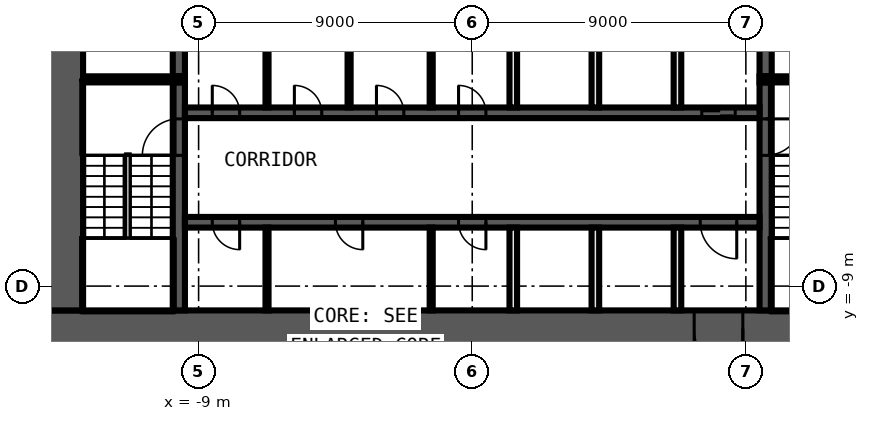
"""IFC4 building model, lengths in metres.
Left out: names, types, materials, properties, quantities, classifications, styles, units other than length and angle.
Written with IfcOpenShell. Run it as: python <this file> out.ifc"""

import sys

from ifc_helpers import new_model, si_unit, direction, frame, frame_2d, origin, place, context, subcontext, project, spatial, rectangle, extrude, element, fill, save


model = new_model("IFC4")
c1 = context("Model", 3, precision=1e-05, world=origin(), true_north=direction((0.0, 1.0)))
c2 = subcontext(c1, "Body", "Model", "MODEL_VIEW")
j1 = project(units=[si_unit("LENGTHUNIT", "METRE"), si_unit("PLANEANGLEUNIT", "RADIAN")], contexts=[c1])
p1 = place(None, origin())
s1 = spatial("IfcSite", under=j1, at=p1, CompositionType="ELEMENT")
p2 = place(p1, origin())
s2 = spatial("IfcBuilding", under=s1, at=p2, CompositionType="ELEMENT")
p3 = place(p2, frame((0.0, 0.0, 27.0)))
s3 = spatial("IfcBuildingStorey", under=s2, at=p3, CompositionType="ELEMENT", Elevation=27.0)
p4 = place(p3, frame((14.0, -10.4, 0.0), z_axis=(0.0, 0.0, 1.0), x_axis=(-1.0, 0.0, 0.0)))
e1 = element("IfcWall", 1, at=p4, inside=s3, PredefinedType="SHEAR", context=c2, shape_type="SweptSolid", body=[
    extrude(rectangle(XDim=28.0, YDim=1.2, at=frame_2d((14.0, 0.0))), origin(), (0.0, 0.0, 1.0), 5.55),
])
p5 = place(p4, frame((5.1, 0.0, 0.0)))
e2 = element("IfcOpeningElement", 2, at=p5, cuts=e1, PredefinedType="OPENING", context=c2, shape_type="SweptSolid", body=[
    extrude(rectangle(XDim=1.6, YDim=2.1, at=frame_2d((0.8, 1.05))), frame((0.0, 0.61, 0.0), z_axis=(0.0, -1.0, 0.0), x_axis=(1.0, 0.0, 0.0)), (0.0, 0.0, 1.0), 1.22),
])
p6 = place(p3, frame((-13.4, -9.8, 0.0), z_axis=(0.0, 0.0, 1.0), x_axis=(0.0, 1.0, 0.0)))
e3 = element("IfcWall", 3, at=p6, inside=s3, PredefinedType="SHEAR", context=c2, shape_type="SweptSolid", body=[
    extrude(rectangle(XDim=19.6, YDim=1.2, at=frame_2d((9.8, 0.0))), origin(), (0.0, 0.0, 1.0), 5.55),
])
p7 = place(p3, frame((9.65, -2.3, 0.0), z_axis=(0.0, 0.0, 1.0), x_axis=(0.0, -1.0, 0.0)))
e4 = element("IfcWall", 4, at=p7, inside=s3, PredefinedType="SHEAR", context=c2, shape_type="SweptSolid", body=[
    extrude(rectangle(XDim=7.5, YDim=0.4, at=frame_2d((3.75, 0.0))), origin(), (0.0, 0.0, 1.0), 5.55),
])
p8 = place(p7, frame((1.2, 0.0, 0.0)))
e5 = element("IfcOpeningElement", 5, at=p8, cuts=e4, PredefinedType="OPENING", context=c2, shape_type="SweptSolid", body=[
    extrude(rectangle(XDim=1.2, YDim=2.1, at=frame_2d((0.6, 1.05))), frame((0.0, 0.21, 0.0), z_axis=(0.0, -1.0, 0.0), x_axis=(1.0, 0.0, 0.0)), (0.0, 0.0, 1.0), 0.42),
])
p9 = place(p3, frame((9.65, 2.1, 0.0), z_axis=(0.0, 0.0, 1.0), x_axis=(0.0, -1.0, 0.0)))
e6 = element("IfcWall", 6, at=p9, inside=s3, PredefinedType="SHEAR", context=c2, shape_type="SweptSolid", body=[
    extrude(rectangle(XDim=4.2, YDim=0.4, at=frame_2d((2.1, 0.0))), origin(), (0.0, 0.0, 1.0), 5.55),
])
p10 = place(p9, frame((0.15, 0.0, 0.0)))
e7 = element("IfcOpeningElement", 7, at=p10, cuts=e6, PredefinedType="OPENING", context=c2, shape_type="SweptSolid", body=[
    extrude(rectangle(XDim=0.9, YDim=2.1, at=frame_2d((0.45, 1.05))), frame((0.0, 0.21, 0.0), z_axis=(0.0, -1.0, 0.0), x_axis=(1.0, 0.0, 0.0)), (0.0, 0.0, 1.0), 0.42),
])
p11 = place(p3, frame((-9.65, -9.8, 0.0), z_axis=(0.0, 0.0, 1.0), x_axis=(0.0, 1.0, 0.0)))
e8 = element("IfcWall", 8, at=p11, inside=s3, PredefinedType="SHEAR", context=c2, shape_type="SweptSolid", body=[
    extrude(rectangle(XDim=7.5, YDim=0.4, at=frame_2d((3.75, 0.0))), origin(), (0.0, 0.0, 1.0), 5.55),
])
p12 = place(p11, frame((5.1, 0.0, 0.0)))
e9 = element("IfcOpeningElement", 9, at=p12, cuts=e8, PredefinedType="OPENING", context=c2, shape_type="SweptSolid", body=[
    extrude(rectangle(XDim=1.2, YDim=2.1, at=frame_2d((0.6, 1.05))), frame((0.0, 0.21, 0.0), z_axis=(0.0, -1.0, 0.0), x_axis=(1.0, 0.0, 0.0)), (0.0, 0.0, 1.0), 0.42),
])
p13 = place(p3, frame((-9.65, -2.1, 0.0), z_axis=(0.0, 0.0, 1.0), x_axis=(0.0, 1.0, 0.0)))
e10 = element("IfcWall", 10, at=p13, inside=s3, PredefinedType="SHEAR", context=c2, shape_type="SweptSolid", body=[
    extrude(rectangle(XDim=4.2, YDim=0.4, at=frame_2d((2.1, 0.0))), origin(), (0.0, 0.0, 1.0), 5.55),
])
for number, where, z_axis, x_axis in (
    (11, (9.45, -2.2, 0.0), (0.0, 0.0, 1.0), (1.0, 0.0, 0.0)),
    (12, (-9.45, -2.2, 0.0), (0.0, 0.0, 1.0), (-1.0, 0.0, 0.0)),
):
    element("IfcWall", number, at=place(p3, frame(where, z_axis=z_axis, x_axis=x_axis)), inside=s3, PredefinedType="SHEAR", context=c2, shape_type="SweptSolid", body=[
        extrude(rectangle(XDim=3.35, YDim=0.2, at=frame_2d((1.675, 0.0))), origin(), (0.0, 0.0, 1.0), 5.55),
    ])
p14 = place(p3, frame((-9.45, -3.3, 0.0), z_axis=(0.0, 0.0, 1.0), x_axis=(1.0, 0.0, 0.0)))
e13 = element("IfcWall", 13, at=p14, inside=s3, PredefinedType="SHEAR", context=c2, shape_type="SweptSolid", body=[
    extrude(rectangle(XDim=18.9, YDim=0.35, at=frame_2d((9.45, 0.0))), origin(), (0.0, 0.0, 1.0), 5.55),
])
p15 = place(p14, frame((17.0, 0.0, 0.0)))
e14 = element("IfcOpeningElement", 14, at=p15, cuts=e13, PredefinedType="OPENING", context=c2, shape_type="SweptSolid", body=[
    extrude(rectangle(XDim=1.1, YDim=2.1, at=frame_2d((0.55, 1.05))), frame((0.0, 0.185, 0.0), z_axis=(0.0, -1.0, 0.0), x_axis=(1.0, 0.0, 0.0)), (0.0, 0.0, 1.0), 0.37),
])
p16 = place(p14, frame((0.9, 0.0, 0.0)))
e15 = element("IfcOpeningElement", 15, at=p16, cuts=e13, PredefinedType="OPENING", context=c2, shape_type="SweptSolid", body=[
    extrude(rectangle(XDim=0.9, YDim=2.1, at=frame_2d((0.45, 1.05))), frame((0.0, 0.185, 0.0), z_axis=(0.0, -1.0, 0.0), x_axis=(1.0, 0.0, 0.0)), (0.0, 0.0, 1.0), 0.37),
])
p17 = place(p14, frame((3.6, 0.0, 0.0)))
e16 = element("IfcOpeningElement", 16, at=p17, cuts=e13, PredefinedType="OPENING", context=c2, shape_type="SweptSolid", body=[
    extrude(rectangle(XDim=0.9, YDim=2.1, at=frame_2d((0.45, 1.05))), frame((0.0, 0.185, 0.0), z_axis=(0.0, -1.0, 0.0), x_axis=(1.0, 0.0, 0.0)), (0.0, 0.0, 1.0), 0.37),
])
p18 = place(p14, frame((6.3, 0.0, 0.0)))
e17 = element("IfcOpeningElement", 17, at=p18, cuts=e13, PredefinedType="OPENING", context=c2, shape_type="SweptSolid", body=[
    extrude(rectangle(XDim=0.9, YDim=2.1, at=frame_2d((0.45, 1.05))), frame((0.0, 0.185, 0.0), z_axis=(0.0, -1.0, 0.0), x_axis=(1.0, 0.0, 0.0)), (0.0, 0.0, 1.0), 0.37),
])
p19 = place(p14, frame((9.0, 0.0, 0.0)))
e18 = element("IfcOpeningElement", 18, at=p19, cuts=e13, PredefinedType="OPENING", context=c2, shape_type="SweptSolid", body=[
    extrude(rectangle(XDim=0.9, YDim=2.1, at=frame_2d((0.45, 1.05))), frame((0.0, 0.185, 0.0), z_axis=(0.0, -1.0, 0.0), x_axis=(1.0, 0.0, 0.0)), (0.0, 0.0, 1.0), 0.37),
])
p20 = place(p3, frame((9.45, -6.9, 0.0), z_axis=(0.0, 0.0, 1.0), x_axis=(-1.0, 0.0, 0.0)))
e19 = element("IfcWall", 19, at=p20, inside=s3, PredefinedType="SHEAR", context=c2, shape_type="SweptSolid", body=[
    extrude(rectangle(XDim=18.9, YDim=0.35, at=frame_2d((9.45, 0.0))), origin(), (0.0, 0.0, 1.0), 5.55),
])
p21 = place(p20, frame((0.75, 0.0, 0.0)))
e20 = element("IfcOpeningElement", 20, at=p21, cuts=e19, PredefinedType="OPENING", context=c2, shape_type="SweptSolid", body=[
    extrude(rectangle(XDim=1.2, YDim=2.1, at=frame_2d((0.6, 1.05))), frame((0.0, 0.185, 0.0), z_axis=(0.0, -1.0, 0.0), x_axis=(1.0, 0.0, 0.0)), (0.0, 0.0, 1.0), 0.37),
])
p22 = place(p20, frame((17.1, 0.0, 0.0)))
e21 = element("IfcOpeningElement", 21, at=p22, cuts=e19, PredefinedType="OPENING", context=c2, shape_type="SweptSolid", body=[
    extrude(rectangle(XDim=0.9, YDim=2.1, at=frame_2d((0.45, 1.05))), frame((0.0, 0.185, 0.0), z_axis=(0.0, -1.0, 0.0), x_axis=(1.0, 0.0, 0.0)), (0.0, 0.0, 1.0), 0.37),
])
p23 = place(p20, frame((13.05, 0.0, 0.0)))
e22 = element("IfcOpeningElement", 22, at=p23, cuts=e19, PredefinedType="OPENING", context=c2, shape_type="SweptSolid", body=[
    extrude(rectangle(XDim=0.9, YDim=2.1, at=frame_2d((0.45, 1.05))), frame((0.0, 0.185, 0.0), z_axis=(0.0, -1.0, 0.0), x_axis=(1.0, 0.0, 0.0)), (0.0, 0.0, 1.0), 0.37),
])
p24 = place(p20, frame((9.0, 0.0, 0.0)))
e23 = element("IfcOpeningElement", 23, at=p24, cuts=e19, PredefinedType="OPENING", context=c2, shape_type="SweptSolid", body=[
    extrude(rectangle(XDim=0.9, YDim=2.1, at=frame_2d((0.45, 1.05))), frame((0.0, 0.185, 0.0), z_axis=(0.0, -1.0, 0.0), x_axis=(1.0, 0.0, 0.0)), (0.0, 0.0, 1.0), 0.37),
])
for number, where, z_axis, x_axis in (
    (24, (6.75, -9.8, 0.0), (0.0, 0.0, 1.0), (0.0, 1.0, 0.0)),
    (25, (6.75, -3.125, 0.0), (0.0, 0.0, 1.0), (0.0, 1.0, 0.0)),
    (26, (4.05, -9.8, 0.0), (0.0, 0.0, 1.0), (0.0, 1.0, 0.0)),
    (27, (4.05, -3.125, 0.0), (0.0, 0.0, 1.0), (0.0, 1.0, 0.0)),
    (28, (1.35, -9.8, 0.0), (0.0, 0.0, 1.0), (0.0, 1.0, 0.0)),
    (29, (1.35, -3.125, 0.0), (0.0, 0.0, 1.0), (0.0, 1.0, 0.0)),
):
    element("IfcWall", number, at=place(p3, frame(where, z_axis=z_axis, x_axis=x_axis)), inside=s3, PredefinedType="SOLIDWALL", context=c2, shape_type="SweptSolid", body=[
        extrude(rectangle(XDim=2.725, YDim=0.25, at=frame_2d((1.363, 0.0))), origin(), (0.0, 0.0, 1.0), 5.55),
    ])
for number, where, z_axis, x_axis in (
    (30, (-1.35, -9.8, 0.0), (0.0, 0.0, 1.0), (0.0, 1.0, 0.0)),
    (31, (-1.35, -3.125, 0.0), (0.0, 0.0, 1.0), (0.0, 1.0, 0.0)),
    (32, (-4.05, -3.125, 0.0), (0.0, 0.0, 1.0), (0.0, 1.0, 0.0)),
    (33, (-6.75, -9.8, 0.0), (0.0, 0.0, 1.0), (0.0, 1.0, 0.0)),
    (34, (-6.75, -3.125, 0.0), (0.0, 0.0, 1.0), (0.0, 1.0, 0.0)),
):
    element("IfcWall", number, at=place(p3, frame(where, z_axis=z_axis, x_axis=x_axis)), inside=s3, PredefinedType="PARTITIONING", context=c2, shape_type="SweptSolid", body=[
        extrude(rectangle(XDim=2.725, YDim=0.1, at=frame_2d((1.363, 0.0))), origin(), (0.0, 0.0, 1.0), 5.55),
    ])
p25 = place(p15, origin())
e35 = element("IfcDoor", 35, at=p25, inside=s3, OperationType="DOUBLE_DOOR_SLIDING", PredefinedType="DOOR", context=c2, shape_type="SweptSolid", body=[
    extrude(rectangle(XDim=1.1, YDim=2.1, at=frame_2d((0.55, 1.05))), frame((0.0, 0.025, 0.0), z_axis=(0.0, -1.0, 0.0), x_axis=(1.0, 0.0, 0.0)), (0.0, 0.0, 1.0), 0.05),
])
fill(e14, e35)
p26 = place(p5, origin())
e36 = element("IfcDoor", 36, at=p26, inside=s3, OperationType="DOUBLE_DOOR_SINGLE_SWING", PredefinedType="DOOR", context=c2, shape_type="SweptSolid", body=[
    extrude(rectangle(XDim=1.6, YDim=2.1, at=frame_2d((0.8, 1.05))), frame((0.0, 0.025, 0.0), z_axis=(0.0, -1.0, 0.0), x_axis=(1.0, 0.0, 0.0)), (0.0, 0.0, 1.0), 0.05),
])
fill(e2, e36)
p27 = place(p21, origin())
e37 = element("IfcDoor", 37, at=p27, inside=s3, OperationType="SINGLE_SWING_LEFT", PredefinedType="DOOR", context=c2, shape_type="SweptSolid", body=[
    extrude(rectangle(XDim=1.2, YDim=2.1, at=frame_2d((0.6, 1.05))), frame((0.0, 0.025, 0.0), z_axis=(0.0, -1.0, 0.0), x_axis=(1.0, 0.0, 0.0)), (0.0, 0.0, 1.0), 0.05),
])
fill(e20, e37)
p28 = place(p16, origin())
e38 = element("IfcDoor", 38, at=p28, inside=s3, OperationType="SINGLE_SWING_RIGHT", PredefinedType="DOOR", context=c2, shape_type="SweptSolid", body=[
    extrude(rectangle(XDim=0.9, YDim=2.1, at=frame_2d((0.45, 1.05))), frame((0.0, 0.025, 0.0), z_axis=(0.0, -1.0, 0.0), x_axis=(1.0, 0.0, 0.0)), (0.0, 0.0, 1.0), 0.05),
])
fill(e15, e38)
p29 = place(p17, origin())
e39 = element("IfcDoor", 39, at=p29, inside=s3, OperationType="SINGLE_SWING_LEFT", PredefinedType="DOOR", context=c2, shape_type="SweptSolid", body=[
    extrude(rectangle(XDim=0.9, YDim=2.1, at=frame_2d((0.45, 1.05))), frame((0.0, 0.025, 0.0), z_axis=(0.0, -1.0, 0.0), x_axis=(1.0, 0.0, 0.0)), (0.0, 0.0, 1.0), 0.05),
])
fill(e16, e39)
p30 = place(p18, origin())
e40 = element("IfcDoor", 40, at=p30, inside=s3, OperationType="SINGLE_SWING_RIGHT", PredefinedType="DOOR", context=c2, shape_type="SweptSolid", body=[
    extrude(rectangle(XDim=0.9, YDim=2.1, at=frame_2d((0.45, 1.05))), frame((0.0, 0.025, 0.0), z_axis=(0.0, -1.0, 0.0), x_axis=(1.0, 0.0, 0.0)), (0.0, 0.0, 1.0), 0.05),
])
fill(e17, e40)
p31 = place(p19, origin())
e41 = element("IfcDoor", 41, at=p31, inside=s3, OperationType="SINGLE_SWING_LEFT", PredefinedType="DOOR", context=c2, shape_type="SweptSolid", body=[
    extrude(rectangle(XDim=0.9, YDim=2.1, at=frame_2d((0.45, 1.05))), frame((0.0, 0.025, 0.0), z_axis=(0.0, -1.0, 0.0), x_axis=(1.0, 0.0, 0.0)), (0.0, 0.0, 1.0), 0.05),
])
fill(e18, e41)
p32 = place(p22, origin())
e42 = element("IfcDoor", 42, at=p32, inside=s3, OperationType="SINGLE_SWING_RIGHT", PredefinedType="DOOR", context=c2, shape_type="SweptSolid", body=[
    extrude(rectangle(XDim=0.9, YDim=2.1, at=frame_2d((0.45, 1.05))), frame((0.0, 0.025, 0.0), z_axis=(0.0, -1.0, 0.0), x_axis=(1.0, 0.0, 0.0)), (0.0, 0.0, 1.0), 0.05),
])
fill(e21, e42)
p33 = place(p23, origin())
e43 = element("IfcDoor", 43, at=p33, inside=s3, OperationType="SINGLE_SWING_LEFT", PredefinedType="DOOR", context=c2, shape_type="SweptSolid", body=[
    extrude(rectangle(XDim=0.9, YDim=2.1, at=frame_2d((0.45, 1.05))), frame((0.0, 0.025, 0.0), z_axis=(0.0, -1.0, 0.0), x_axis=(1.0, 0.0, 0.0)), (0.0, 0.0, 1.0), 0.05),
])
fill(e22, e43)
p34 = place(p24, origin())
e44 = element("IfcDoor", 44, at=p34, inside=s3, OperationType="SINGLE_SWING_RIGHT", PredefinedType="DOOR", context=c2, shape_type="SweptSolid", body=[
    extrude(rectangle(XDim=0.9, YDim=2.1, at=frame_2d((0.45, 1.05))), frame((0.0, 0.025, 0.0), z_axis=(0.0, -1.0, 0.0), x_axis=(1.0, 0.0, 0.0)), (0.0, 0.0, 1.0), 0.05),
])
fill(e23, e44)
p35 = place(p8, origin())
e45 = element("IfcDoor", 45, at=p35, inside=s3, OperationType="SINGLE_SWING_RIGHT", PredefinedType="DOOR", context=c2, shape_type="SweptSolid", body=[
    extrude(rectangle(XDim=1.2, YDim=2.1, at=frame_2d((0.6, 1.05))), frame((0.0, 0.025, 0.0), z_axis=(0.0, -1.0, 0.0), x_axis=(1.0, 0.0, 0.0)), (0.0, 0.0, 1.0), 0.05),
])
fill(e5, e45)
p36 = place(p12, origin())
e46 = element("IfcDoor", 46, at=p36, inside=s3, OperationType="SINGLE_SWING_LEFT", PredefinedType="DOOR", context=c2, shape_type="SweptSolid", body=[
    extrude(rectangle(XDim=1.2, YDim=2.1, at=frame_2d((0.6, 1.05))), frame((0.0, 0.025, 0.0), z_axis=(0.0, -1.0, 0.0), x_axis=(1.0, 0.0, 0.0)), (0.0, 0.0, 1.0), 0.05),
])
fill(e9, e46)
save(model, sys.argv[1])
